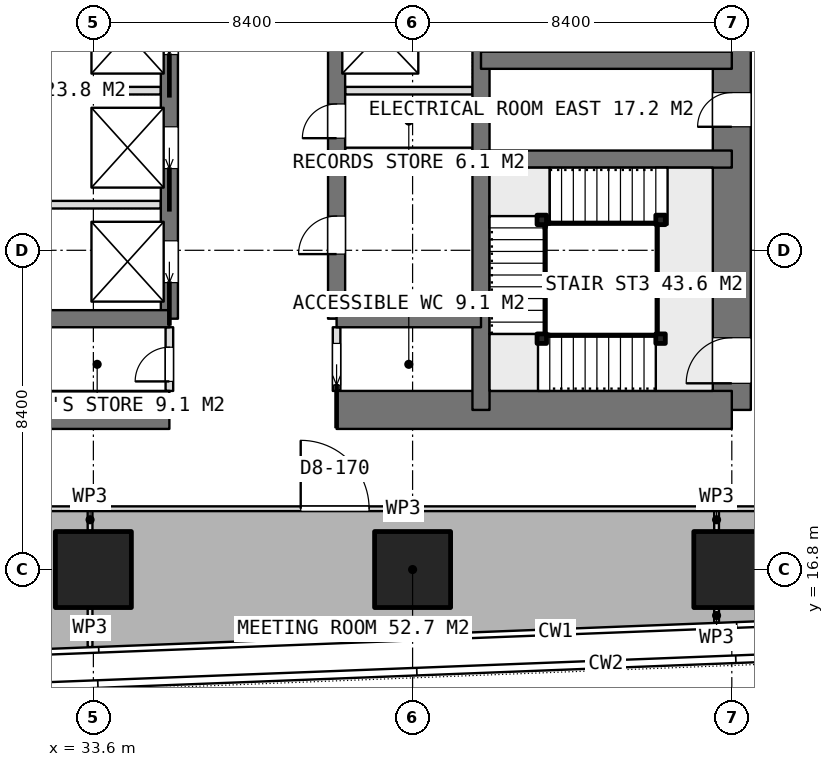
"""IFC4 building model, lengths in metres.
Left out: names, types, materials, properties, quantities, classifications, styles, units other than length and angle.
Written with IfcOpenShell. Run it as: python <this file> out.ifc"""

import sys

from ifc_helpers import new_model, si_unit, direction, frame, frame_2d, origin, origin_2d, place, context, subcontext, project, spatial, rectangle, extrude, element, fill, save


model = new_model("IFC4")
c1 = context("Model", 3, precision=1e-05, world=origin(), true_north=direction((0.0, 1.0)))
c2 = subcontext(c1, "Body", "Model", "MODEL_VIEW")
j1 = project(units=[si_unit("LENGTHUNIT", "METRE"), si_unit("PLANEANGLEUNIT", "RADIAN")], contexts=[c1])
p1 = place(None, origin())
s1 = spatial("IfcSite", under=j1, at=p1, CompositionType="ELEMENT")
p2 = place(p1, origin())
s2 = spatial("IfcBuilding", under=s1, at=p2, CompositionType="ELEMENT")
p3 = place(p2, frame((0.0, 0.0, 144.05)))
s3 = spatial("IfcBuildingStorey", under=s2, at=p3, CompositionType="ELEMENT", Elevation=144.05)
p4 = place(p3, frame((25.2, 21.0, 0.0), z_axis=(0.0, 0.0, 1.0), x_axis=(1.0, 0.0, 0.0)))
e1 = element("IfcWall", 1, at=p4, inside=s3, PredefinedType="SHEAR", context=c2, shape_type="SweptSolid", body=[
    extrude(rectangle(XDim=10.4, YDim=1.0, at=frame_2d((5.2, 0.0))), origin(), (0.0, 0.0, 1.0), 3.75),
])
p5 = place(p3, frame((40.0, 21.0, 0.0), z_axis=(0.0, 0.0, 1.0), x_axis=(1.0, 0.0, 0.0)))
e2 = element("IfcWall", 2, at=p5, inside=s3, PredefinedType="SHEAR", context=c2, shape_type="SweptSolid", body=[
    extrude(rectangle(XDim=10.4, YDim=1.0, at=frame_2d((5.2, 0.0))), origin(), (0.0, 0.0, 1.0), 3.75),
])
p6 = place(p3, frame((50.4, 21.0, 0.0), z_axis=(0.0, 0.0, 1.0), x_axis=(0.0, 1.0, 0.0)))
e3 = element("IfcWall", 3, at=p6, inside=s3, PredefinedType="SHEAR", context=c2, shape_type="SweptSolid", body=[
    extrude(rectangle(XDim=25.2, YDim=1.0, at=frame_2d((12.6, 0.0))), origin(), (0.0, 0.0, 1.0), 3.75),
])
p7 = place(p6, frame((16.2, 0.0, 0.0)))
e4 = element("IfcOpeningElement", 4, at=p7, cuts=e3, PredefinedType="OPENING", context=c2, shape_type="SweptSolid", body=[
    extrude(rectangle(XDim=1.2, YDim=2.1, at=frame_2d((0.6, 1.05))), frame((0.0, 0.51, 0.0), z_axis=(0.0, -1.0, 0.0), x_axis=(1.0, 0.0, 0.0)), (0.0, 0.0, 1.0), 1.02),
])
p8 = place(p6, frame((10.05, 0.0, 0.0)))
e5 = element("IfcOpeningElement", 5, at=p8, cuts=e3, PredefinedType="OPENING", context=c2, shape_type="SweptSolid", body=[
    extrude(rectangle(XDim=0.9, YDim=2.1, at=frame_2d((0.45, 1.05))), frame((0.0, 0.51, 0.0), z_axis=(0.0, -1.0, 0.0), x_axis=(1.0, 0.0, 0.0)), (0.0, 0.0, 1.0), 1.02),
])
p9 = place(p6, frame((7.45, 0.0, 0.0)))
e6 = element("IfcOpeningElement", 6, at=p9, cuts=e3, PredefinedType="OPENING", context=c2, shape_type="SweptSolid", body=[
    extrude(rectangle(XDim=0.9, YDim=2.1, at=frame_2d((0.45, 1.05))), frame((0.0, 0.51, 0.0), z_axis=(0.0, -1.0, 0.0), x_axis=(1.0, 0.0, 0.0)), (0.0, 0.0, 1.0), 1.02),
])
p10 = place(p6, frame((0.7, 0.0, 0.0)))
e7 = element("IfcOpeningElement", 7, at=p10, cuts=e3, PredefinedType="OPENING", context=c2, shape_type="SweptSolid", body=[
    extrude(rectangle(XDim=1.2, YDim=2.1, at=frame_2d((0.6, 1.05))), frame((0.0, 0.51, 0.0), z_axis=(0.0, -1.0, 0.0), x_axis=(1.0, 0.0, 0.0)), (0.0, 0.0, 1.0), 1.02),
])
p11 = place(p3, frame((43.8, 21.0, 0.0), z_axis=(0.0, 0.0, 1.0), x_axis=(0.0, 1.0, 0.0)))
e8 = element("IfcWall", 8, at=p11, inside=s3, PredefinedType="SHEAR", context=c2, shape_type="SweptSolid", body=[
    extrude(rectangle(XDim=25.2, YDim=0.45, at=frame_2d((12.6, 0.0))), origin(), (0.0, 0.0, 1.0), 3.75),
])
p12 = place(p3, frame((35.6, 23.4, 0.0), z_axis=(0.0, 0.0, 1.0), x_axis=(0.0, 1.0, 0.0)))
e9 = element("IfcWall", 9, at=p12, inside=s3, PredefinedType="SHEAR", context=c2, shape_type="SweptSolid", body=[
    extrude(rectangle(XDim=18.0, YDim=0.45, at=frame_2d((9.0, 0.0))), origin(), (0.0, 0.0, 1.0), 3.75),
])
p13 = place(p12, frame((0.95, 0.0, 0.0)))
e10 = element("IfcOpeningElement", 10, at=p13, cuts=e9, PredefinedType="OPENING", context=c2, shape_type="SweptSolid", body=[
    extrude(rectangle(XDim=1.1, YDim=2.1, at=frame_2d((0.55, 1.05))), frame((0.0, 0.235, 0.0), z_axis=(0.0, -1.0, 0.0), x_axis=(1.0, 0.0, 0.0)), (0.0, 0.0, 1.0), 0.47),
])
p14 = place(p12, frame((3.95, 0.0, 0.0)))
e11 = element("IfcOpeningElement", 11, at=p14, cuts=e9, PredefinedType="OPENING", context=c2, shape_type="SweptSolid", body=[
    extrude(rectangle(XDim=1.1, YDim=2.1, at=frame_2d((0.55, 1.05))), frame((0.0, 0.235, 0.0), z_axis=(0.0, -1.0, 0.0), x_axis=(1.0, 0.0, 0.0)), (0.0, 0.0, 1.0), 0.47),
])
p15 = place(p12, frame((6.95, 0.0, 0.0)))
e12 = element("IfcOpeningElement", 12, at=p15, cuts=e9, PredefinedType="OPENING", context=c2, shape_type="SweptSolid", body=[
    extrude(rectangle(XDim=1.1, YDim=2.1, at=frame_2d((0.55, 1.05))), frame((0.0, 0.235, 0.0), z_axis=(0.0, -1.0, 0.0), x_axis=(1.0, 0.0, 0.0)), (0.0, 0.0, 1.0), 0.47),
])
p16 = place(p12, frame((9.95, 0.0, 0.0)))
e13 = element("IfcOpeningElement", 13, at=p16, cuts=e9, PredefinedType="OPENING", context=c2, shape_type="SweptSolid", body=[
    extrude(rectangle(XDim=1.1, YDim=2.1, at=frame_2d((0.55, 1.05))), frame((0.0, 0.235, 0.0), z_axis=(0.0, -1.0, 0.0), x_axis=(1.0, 0.0, 0.0)), (0.0, 0.0, 1.0), 0.47),
])
p17 = place(p12, frame((12.95, 0.0, 0.0)))
e14 = element("IfcOpeningElement", 14, at=p17, cuts=e9, PredefinedType="OPENING", context=c2, shape_type="SweptSolid", body=[
    extrude(rectangle(XDim=1.1, YDim=2.1, at=frame_2d((0.55, 1.05))), frame((0.0, 0.235, 0.0), z_axis=(0.0, -1.0, 0.0), x_axis=(1.0, 0.0, 0.0)), (0.0, 0.0, 1.0), 0.47),
])
p18 = place(p12, frame((15.95, 0.0, 0.0)))
e15 = element("IfcOpeningElement", 15, at=p18, cuts=e9, PredefinedType="OPENING", context=c2, shape_type="SweptSolid", body=[
    extrude(rectangle(XDim=1.1, YDim=2.1, at=frame_2d((0.55, 1.05))), frame((0.0, 0.235, 0.0), z_axis=(0.0, -1.0, 0.0), x_axis=(1.0, 0.0, 0.0)), (0.0, 0.0, 1.0), 0.47),
])
p19 = place(p3, frame((40.0, 23.4, 0.0), z_axis=(0.0, 0.0, 1.0), x_axis=(0.0, 1.0, 0.0)))
e16 = element("IfcWall", 16, at=p19, inside=s3, PredefinedType="SHEAR", context=c2, shape_type="SweptSolid", body=[
    extrude(rectangle(XDim=18.0, YDim=0.45, at=frame_2d((9.0, 0.0))), origin(), (0.0, 0.0, 1.0), 3.75),
])
p20 = place(p19, frame((1.7, 0.0, 0.0)))
e17 = element("IfcOpeningElement", 17, at=p20, cuts=e16, PredefinedType="OPENING", context=c2, shape_type="SweptSolid", body=[
    extrude(rectangle(XDim=1.0, YDim=2.1, at=frame_2d((0.5, 1.05))), frame((0.0, 0.235, 0.0), z_axis=(0.0, -1.0, 0.0), x_axis=(1.0, 0.0, 0.0)), (0.0, 0.0, 1.0), 0.47),
])
p21 = place(p19, frame((4.75, 0.0, 0.0)))
e18 = element("IfcOpeningElement", 18, at=p21, cuts=e16, PredefinedType="OPENING", context=c2, shape_type="SweptSolid", body=[
    extrude(rectangle(XDim=0.9, YDim=2.1, at=frame_2d((0.45, 1.05))), frame((0.0, 0.235, 0.0), z_axis=(0.0, -1.0, 0.0), x_axis=(1.0, 0.0, 0.0)), (0.0, 0.0, 1.0), 0.47),
])
for number, where, z_axis, x_axis in (
    (19, (31.8, 23.4, 0.0), (0.0, 0.0, 1.0), (1.0, 0.0, 0.0)),
    (20, (40.0, 23.4, 0.0), (0.0, 0.0, 1.0), (1.0, 0.0, 0.0)),
):
    element("IfcWall", number, at=place(p3, frame(where, z_axis=z_axis, x_axis=x_axis)), inside=s3, PredefinedType="SHEAR", context=c2, shape_type="SweptSolid", body=[
        extrude(rectangle(XDim=3.8, YDim=0.45, at=frame_2d((1.9, 0.0))), origin(), (0.0, 0.0, 1.0), 3.75),
    ])
for number, where, z_axis, x_axis in (
    (21, (43.8, 27.6, 0.0), (0.0, 0.0, 1.0), (1.0, 0.0, 0.0)),
    (22, (43.8, 30.2, 0.0), (0.0, 0.0, 1.0), (1.0, 0.0, 0.0)),
):
    element("IfcWall", number, at=place(p3, frame(where, z_axis=z_axis, x_axis=x_axis)), inside=s3, PredefinedType="SHEAR", context=c2, shape_type="SweptSolid", body=[
        extrude(rectangle(XDim=6.6, YDim=0.45, at=frame_2d((3.3, 0.0))), origin(), (0.0, 0.0, 1.0), 3.75),
    ])
for number, where, z_axis, x_axis in (
    (23, (33.6, 16.8, 0.0), (0.0, 0.0, 1.0), (1.0, 0.0, 0.0)),
    (24, (42.0, 16.8, 0.0), (0.0, 0.0, 1.0), (1.0, 0.0, 0.0)),
    (25, (50.4, 16.8, 0.0), (0.0, 0.0, 1.0), (1.0, 0.0, 0.0)),
):
    element("IfcColumn", number, at=place(p3, frame(where, z_axis=z_axis, x_axis=x_axis)), inside=s3, PredefinedType="COLUMN", context=c2, shape_type="SweptSolid", body=[
        extrude(rectangle(XDim=2.0, YDim=2.0, at=origin_2d()), origin(), (0.0, 0.0, 1.0), 3.75),
    ])
for number, where, z_axis, x_axis in (
    (26, (32.025, 26.4, 0.0), (0.0, 0.0, 1.0), (1.0, 0.0, 0.0)),
    (27, (32.025, 29.4, 0.0), (0.0, 0.0, 1.0), (1.0, 0.0, 0.0)),
):
    element("IfcWall", number, at=place(p3, frame(where, z_axis=z_axis, x_axis=x_axis)), inside=s3, PredefinedType="PARTITIONING", context=c2, shape_type="SweptSolid", body=[
        extrude(rectangle(XDim=3.35, YDim=0.2, at=frame_2d((1.675, 0.0))), origin(), (0.0, 0.0, 1.0), 3.5),
    ])
p22 = place(p3, frame((40.225, 29.4, 0.0), z_axis=(0.0, 0.0, 1.0), x_axis=(1.0, 0.0, 0.0)))
e28 = element("IfcWall", 28, at=p22, inside=s3, PredefinedType="PARTITIONING", context=c2, shape_type="SweptSolid", body=[
    extrude(rectangle(XDim=3.35, YDim=0.2, at=frame_2d((1.675, 0.0))), origin(), (0.0, 0.0, 1.0), 3.5),
])
p23 = place(p3, frame((40.0, 21.5, 0.0), z_axis=(0.0, 0.0, 1.0), x_axis=(0.0, 1.0, 0.0)))
e29 = element("IfcWall", 29, at=p23, inside=s3, PredefinedType="PARTITIONING", context=c2, shape_type="SweptSolid", body=[
    extrude(rectangle(XDim=1.675, YDim=0.2, at=frame_2d((0.837, 0.0))), origin(), (0.0, 0.0, 1.0), 3.5),
])
p24 = place(p23, frame((0.15, 0.0, 0.0)))
e30 = element("IfcOpeningElement", 30, at=p24, cuts=e29, PredefinedType="OPENING", context=c2, shape_type="SweptSolid", body=[
    extrude(rectangle(XDim=1.1, YDim=2.1, at=frame_2d((0.55, 1.05))), frame((0.0, 0.11, 0.0), z_axis=(0.0, -1.0, 0.0), x_axis=(1.0, 0.0, 0.0)), (0.0, 0.0, 1.0), 0.22),
])
p25 = place(p3, frame((35.6, 21.5, 0.0), z_axis=(0.0, 0.0, 1.0), x_axis=(0.0, 1.0, 0.0)))
e31 = element("IfcWall", 31, at=p25, inside=s3, PredefinedType="PARTITIONING", context=c2, shape_type="SweptSolid", body=[
    extrude(rectangle(XDim=1.675, YDim=0.2, at=frame_2d((0.837, 0.0))), origin(), (0.0, 0.0, 1.0), 3.5),
])
p26 = place(p25, frame((0.25, 0.0, 0.0)))
e32 = element("IfcOpeningElement", 32, at=p26, cuts=e31, PredefinedType="OPENING", context=c2, shape_type="SweptSolid", body=[
    extrude(rectangle(XDim=0.9, YDim=2.1, at=frame_2d((0.45, 1.05))), frame((0.0, 0.11, 0.0), z_axis=(0.0, -1.0, 0.0), x_axis=(1.0, 0.0, 0.0)), (0.0, 0.0, 1.0), 0.22),
])
p27 = place(p3, frame((40.225, 27.8, 0.0), z_axis=(0.0, 0.0, 1.0), x_axis=(1.0, 0.0, 0.0)))
e33 = element("IfcWall", 33, at=p27, inside=s3, PredefinedType="PARTITIONING", context=c2, shape_type="SweptSolid", body=[
    extrude(rectangle(XDim=3.35, YDim=0.2, at=frame_2d((1.675, 0.0))), origin(), (0.0, 0.0, 1.0), 3.5),
])
p28 = place(p3, frame((49.999, 15.401, 0.0), z_axis=(0.0, 0.0, 1.0), x_axis=(0.0, 1.0, 0.0)))
e34 = element("IfcWall", 34, at=p28, inside=s3, PredefinedType="PARTITIONING", context=c2, shape_type="SweptSolid", body=[
    extrude(rectangle(XDim=0.379, YDim=0.125, at=frame_2d((0.189, 0.0))), origin(), (0.0, 0.0, 1.0), 3.5),
])
p29 = place(p3, frame((49.999, 17.82, 0.0), z_axis=(0.0, 0.0, 1.0), x_axis=(0.0, 1.0, 0.0)))
e35 = element("IfcWall", 35, at=p29, inside=s3, PredefinedType="PARTITIONING", context=c2, shape_type="SweptSolid", body=[
    extrude(rectangle(XDim=0.58, YDim=0.125, at=frame_2d((0.29, 0.0))), origin(), (0.0, 0.0, 1.0), 3.5),
])
p30 = place(p3, frame((49.999, 18.4, 0.0), z_axis=(0.0, 0.0, 1.0), x_axis=(1.0, 0.0, 0.0)))
e36 = element("IfcWall", 36, at=p30, inside=s3, PredefinedType="PARTITIONING", context=c2, shape_type="SweptSolid", body=[
    extrude(rectangle(XDim=6.401, YDim=0.125, at=frame_2d((3.2, 0.0))), origin(), (0.0, 0.0, 1.0), 3.5),
])
p31 = place(p30, frame((2.7, 0.0, 0.0)))
e37 = element("IfcOpeningElement", 37, at=p31, cuts=e36, PredefinedType="OPENING", context=c2, shape_type="SweptSolid", body=[
    extrude(rectangle(XDim=1.0, YDim=2.1, at=frame_2d((0.5, 1.05))), frame((0.0, 0.073, 0.0), z_axis=(0.0, -1.0, 0.0), x_axis=(1.0, 0.0, 0.0)), (0.0, 0.0, 1.0), 0.145),
])
p32 = place(p3, frame((33.513, 18.4, 0.0), z_axis=(0.0, 0.0, 1.0), x_axis=(0.0, -1.0, 0.0)))
e38 = element("IfcWall", 38, at=p32, inside=s3, PredefinedType="PARTITIONING", context=c2, shape_type="SweptSolid", body=[
    extrude(rectangle(XDim=0.58, YDim=0.125, at=frame_2d((0.29, 0.0))), origin(), (0.0, 0.0, 1.0), 3.5),
])
p33 = place(p3, frame((33.513, 15.78, 0.0), z_axis=(0.0, 0.0, 1.0), x_axis=(0.0, -1.0, 0.0)))
e39 = element("IfcWall", 39, at=p33, inside=s3, PredefinedType="PARTITIONING", context=c2, shape_type="SweptSolid", body=[
    extrude(rectangle(XDim=1.02, YDim=0.125, at=frame_2d((0.51, 0.0))), origin(), (0.0, 0.0, 1.0), 3.5),
])
p34 = place(p3, frame((25.202, 18.4, 0.0), z_axis=(0.0, 0.0, 1.0), x_axis=(1.0, 0.0, 0.0)))
e40 = element("IfcWall", 40, at=p34, inside=s3, PredefinedType="PARTITIONING", context=c2, shape_type="SweptSolid", body=[
    extrude(rectangle(XDim=8.311, YDim=0.125, at=frame_2d((4.156, 0.0))), origin(), (0.0, 0.0, 1.0), 3.5),
])
p35 = place(p34, frame((3.655, 0.0, 0.0)))
e41 = element("IfcOpeningElement", 41, at=p35, cuts=e40, PredefinedType="OPENING", context=c2, shape_type="SweptSolid", body=[
    extrude(rectangle(XDim=1.0, YDim=2.1, at=frame_2d((0.5, 1.05))), frame((0.0, 0.073, 0.0), z_axis=(0.0, -1.0, 0.0), x_axis=(1.0, 0.0, 0.0)), (0.0, 0.0, 1.0), 0.145),
])
p36 = place(p3, frame((33.513, 18.4, 0.0), z_axis=(0.0, 0.0, 1.0), x_axis=(1.0, 0.0, 0.0)))
e42 = element("IfcWall", 42, at=p36, inside=s3, PredefinedType="PARTITIONING", context=c2, shape_type="SweptSolid", body=[
    extrude(rectangle(XDim=16.485, YDim=0.125, at=frame_2d((8.243, 0.0))), origin(), (0.0, 0.0, 1.0), 3.5),
])
p37 = place(p36, frame((5.543, 0.0, 0.0)))
e43 = element("IfcOpeningElement", 43, at=p37, cuts=e42, PredefinedType="OPENING", context=c2, shape_type="SweptSolid", body=[
    extrude(rectangle(XDim=1.8, YDim=2.1, at=frame_2d((0.9, 1.05))), frame((0.0, 0.073, 0.0), z_axis=(0.0, -1.0, 0.0), x_axis=(1.0, 0.0, 0.0)), (0.0, 0.0, 1.0), 0.145),
])
for number, where, z_axis, x_axis in (
    (44, (48.525, 22.875, 0.0), (0.0, 0.0, 1.0), (1.0, 0.0, 0.0)),
    (45, (45.4, 22.875, 0.0), (0.0, 0.0, 1.0), (1.0, 0.0, 0.0)),
    (46, (45.4, 26.0, 0.0), (0.0, 0.0, 1.0), (1.0, 0.0, 0.0)),
    (47, (48.525, 26.0, 0.0), (0.0, 0.0, 1.0), (1.0, 0.0, 0.0)),
):
    element("IfcColumn", number, at=place(p3, frame(where, z_axis=z_axis, x_axis=x_axis)), inside=s3, PredefinedType="COLUMN", context=c2, shape_type="SweptSolid", body=[
        extrude(rectangle(XDim=0.25, YDim=0.25, at=origin_2d()), origin(), (0.0, 0.0, 1.0), 3.75),
    ])
p38 = place(p9, origin())
e48 = element("IfcDoor", 48, at=p38, inside=s3, OperationType="SINGLE_SWING_LEFT", PredefinedType="DOOR", context=c2, shape_type="SweptSolid", body=[
    extrude(rectangle(XDim=0.9, YDim=2.1, at=frame_2d((0.45, 1.05))), frame((0.0, 0.025, 0.0), z_axis=(0.0, -1.0, 0.0), x_axis=(1.0, 0.0, 0.0)), (0.0, 0.0, 1.0), 0.05),
])
fill(e6, e48)
p39 = place(p24, origin())
e49 = element("IfcDoor", 49, at=p39, inside=s3, OperationType="SLIDING_TO_LEFT", PredefinedType="DOOR", context=c2, shape_type="SweptSolid", body=[
    extrude(rectangle(XDim=1.1, YDim=2.1, at=frame_2d((0.55, 1.05))), frame((0.0, 0.025, 0.0), z_axis=(0.0, -1.0, 0.0), x_axis=(1.0, 0.0, 0.0)), (0.0, 0.0, 1.0), 0.05),
])
fill(e30, e49)
p40 = place(p26, origin())
e50 = element("IfcDoor", 50, at=p40, inside=s3, OperationType="SINGLE_SWING_LEFT", PredefinedType="DOOR", context=c2, shape_type="SweptSolid", body=[
    extrude(rectangle(XDim=0.9, YDim=2.1, at=frame_2d((0.45, 1.05))), frame((0.0, 0.025, 0.0), z_axis=(0.0, -1.0, 0.0), x_axis=(1.0, 0.0, 0.0)), (0.0, 0.0, 1.0), 0.05),
])
fill(e32, e50)
p41 = place(p20, origin())
e51 = element("IfcDoor", 51, at=p41, inside=s3, OperationType="SINGLE_SWING_LEFT", PredefinedType="DOOR", context=c2, shape_type="SweptSolid", body=[
    extrude(rectangle(XDim=1.0, YDim=2.1, at=frame_2d((0.5, 1.05))), frame((0.0, 0.025, 0.0), z_axis=(0.0, -1.0, 0.0), x_axis=(1.0, 0.0, 0.0)), (0.0, 0.0, 1.0), 0.05),
])
fill(e17, e51)
p42 = place(p21, origin())
e52 = element("IfcDoor", 52, at=p42, inside=s3, OperationType="SINGLE_SWING_LEFT", PredefinedType="DOOR", context=c2, shape_type="SweptSolid", body=[
    extrude(rectangle(XDim=0.9, YDim=2.1, at=frame_2d((0.45, 1.05))), frame((0.0, 0.025, 0.0), z_axis=(0.0, -1.0, 0.0), x_axis=(1.0, 0.0, 0.0)), (0.0, 0.0, 1.0), 0.05),
])
fill(e18, e52)
p43 = place(p13, origin())
e53 = element("IfcDoor", 53, at=p43, inside=s3, OperationType="SLIDING_TO_LEFT", PredefinedType="USERDEFINED", context=c2, shape_type="SweptSolid", body=[
    extrude(rectangle(XDim=1.1, YDim=2.1, at=frame_2d((0.55, 1.05))), frame((0.0, 0.025, 0.0), z_axis=(0.0, -1.0, 0.0), x_axis=(1.0, 0.0, 0.0)), (0.0, 0.0, 1.0), 0.05),
])
fill(e10, e53)
p44 = place(p14, origin())
e54 = element("IfcDoor", 54, at=p44, inside=s3, OperationType="SLIDING_TO_LEFT", PredefinedType="USERDEFINED", context=c2, shape_type="SweptSolid", body=[
    extrude(rectangle(XDim=1.1, YDim=2.1, at=frame_2d((0.55, 1.05))), frame((0.0, 0.025, 0.0), z_axis=(0.0, -1.0, 0.0), x_axis=(1.0, 0.0, 0.0)), (0.0, 0.0, 1.0), 0.05),
])
fill(e11, e54)
p45 = place(p15, origin())
e55 = element("IfcDoor", 55, at=p45, inside=s3, OperationType="SLIDING_TO_LEFT", PredefinedType="USERDEFINED", context=c2, shape_type="SweptSolid", body=[
    extrude(rectangle(XDim=1.1, YDim=2.1, at=frame_2d((0.55, 1.05))), frame((0.0, 0.025, 0.0), z_axis=(0.0, -1.0, 0.0), x_axis=(1.0, 0.0, 0.0)), (0.0, 0.0, 1.0), 0.05),
])
fill(e12, e55)
p46 = place(p37, origin())
e56 = element("IfcDoor", 56, at=p46, inside=s3, OperationType="DOUBLE_DOOR_SINGLE_SWING", PredefinedType="DOOR", context=c2, shape_type="SweptSolid", body=[
    extrude(rectangle(XDim=1.8, YDim=2.1, at=frame_2d((0.9, 1.05))), frame((0.0, 0.025, 0.0), z_axis=(0.0, -1.0, 0.0), x_axis=(1.0, 0.0, 0.0)), (0.0, 0.0, 1.0), 0.05),
])
fill(e43, e56)
p47 = place(p10, origin())
e57 = element("IfcDoor", 57, at=p47, inside=s3, OperationType="SINGLE_SWING_RIGHT", PredefinedType="DOOR", context=c2, shape_type="SweptSolid", body=[
    extrude(rectangle(XDim=1.2, YDim=2.1, at=frame_2d((0.6, 1.05))), frame((0.0, 0.025, 0.0), z_axis=(0.0, -1.0, 0.0), x_axis=(1.0, 0.0, 0.0)), (0.0, 0.0, 1.0), 0.05),
])
fill(e7, e57)
save(model, sys.argv[1])
